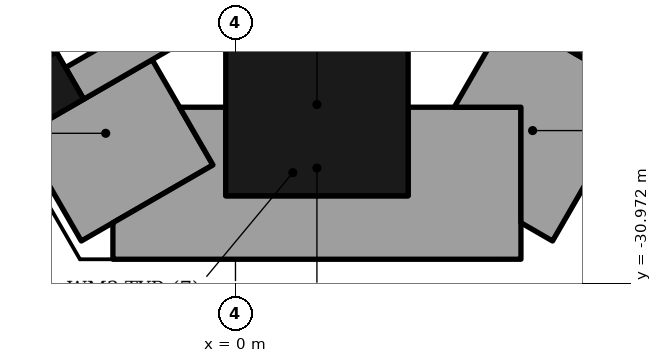
"""IFC4 building model, lengths in metres.
Left out: names, types, materials, properties, quantities, classifications, styles, units other than length and angle.
Written with IfcOpenShell. Run it as: python <this file> out.ifc"""

import sys

from ifc_helpers import new_model, si_unit, direction, frame, frame_2d, origin, origin_2d, place, context, subcontext, project, spatial, polyline, rectangle, outline, extrude, element, save


model = new_model("IFC4")
c1 = context("Model", 3, precision=1e-05, world=origin(), true_north=direction((0.0, 1.0)))
c2 = subcontext(c1, "Body", "Model", "MODEL_VIEW")
j1 = project(units=[si_unit("LENGTHUNIT", "METRE"), si_unit("PLANEANGLEUNIT", "RADIAN")], contexts=[c1])
p1 = place(None, origin())
s1 = spatial("IfcSite", under=j1, at=p1, CompositionType="ELEMENT")
p2 = place(p1, origin())
s2 = spatial("IfcBuilding", under=s1, at=p2, CompositionType="ELEMENT")
p3 = place(p2, frame((0.0, 0.0, 91.8)))
s3 = spatial("IfcBuildingStorey", under=s2, at=p3, CompositionType="ELEMENT", Elevation=91.8)
p4 = place(p3, frame((1.34, -28.03, 0.0), z_axis=(0.0, 0.0, 1.0), x_axis=(0.0, 1.0, 0.0)))
e1 = element("IfcColumn", 1, at=p4, inside=s3, PredefinedType="COLUMN", context=c2, shape_type="SweptSolid", body=[
    extrude(rectangle(XDim=3.0, YDim=3.0, at=origin_2d()), origin(), (0.0, 0.0, 1.0), 3.4),
])
for number, where, z_axis, x_axis in (
    (2, (-3.241, -27.852, 0.0), (0.0, 0.0, 1.0), (0.5, -0.866, 0.0)),
    (3, (6.347, -27.111, 0.0), (0.0, 0.0, 1.0), (0.5, 0.866, 0.0)),
):
    element("IfcColumn", number, at=place(p3, frame(where, z_axis=z_axis, x_axis=x_axis)), inside=s3, PredefinedType="COLUMN", context=c2, shape_type="SweptSolid", body=[
        extrude(rectangle(XDim=0.9, YDim=1.2, at=origin_2d()), origin(), (0.0, 0.0, 1.0), 3.4),
    ])
p5 = place(p3, frame((-1.217, -26.857, 0.0), z_axis=(0.0, 0.0, 1.0), x_axis=(-0.866040211805, -0.499974350878, 0.0)))
e4 = element("IfcWall", 4, at=p5, inside=s3, PredefinedType="SOLIDWALL", context=c2, shape_type="SweptSolid", body=[
    extrude(rectangle(XDim=1.65, YDim=0.6, at=frame_2d((0.825, 0.0))), origin(), (0.0, 0.0, 1.0), 2.63),
])
p6 = place(p3, frame((5.752, -26.941, 0.0), z_axis=(0.0, 0.0, 1.0), x_axis=(-0.866030301974, 0.499991515992, 0.0)))
e5 = element("IfcWall", 5, at=p6, inside=s3, PredefinedType="SOLIDWALL", context=c2, shape_type="SweptSolid", body=[
    extrude(rectangle(XDim=1.649, YDim=0.6, at=frame_2d((0.825, 0.0))), origin(), (0.0, 0.0, 1.0), 2.45),
])
p7 = place(p3, origin())
e6 = element("IfcWall", 6, at=p7, inside=s3, PredefinedType="SOLIDWALL", context=c2, shape_type="SweptSolid", body=[
    extrude(outline(polyline([(-3.535, -28.542), (-2.535, -30.273), (-0.37, -29.023), (-1.37, -27.292), (-2.496, -27.942), (-2.496, -27.942), (-3.535, -28.542)])), origin(), (0.0, 0.0, 1.0), 2.63),
])
p8 = place(p3, origin())
e7 = element("IfcWall", 7, at=p8, inside=s3, PredefinedType="SOLIDWALL", context=c2, shape_type="SweptSolid", body=[
    extrude(outline(polyline([(-0.919, -28.073), (-0.37, -29.023), (-2.016, -29.973), (-2.016, -30.573), (4.695, -30.573), (4.695, -28.073), (2.84, -28.073), (2.84, -29.53), (-0.16, -29.53), (-0.16, -28.073), (-0.919, -28.073)])), origin(), (0.0, 0.0, 1.0), 2.63),
])
p9 = place(p3, origin())
e8 = element("IfcWall", 8, at=p9, inside=s3, PredefinedType="SOLIDWALL", context=c2, shape_type="SweptSolid", body=[
    extrude(outline(polyline([(6.642, -27.801), (4.477, -26.551), (3.598, -28.073), (4.695, -28.073), (4.695, -29.973), (5.215, -30.273), (6.642, -27.801)])), origin(), (0.0, 0.0, 1.0), 2.552),
])
save(model, sys.argv[1])
